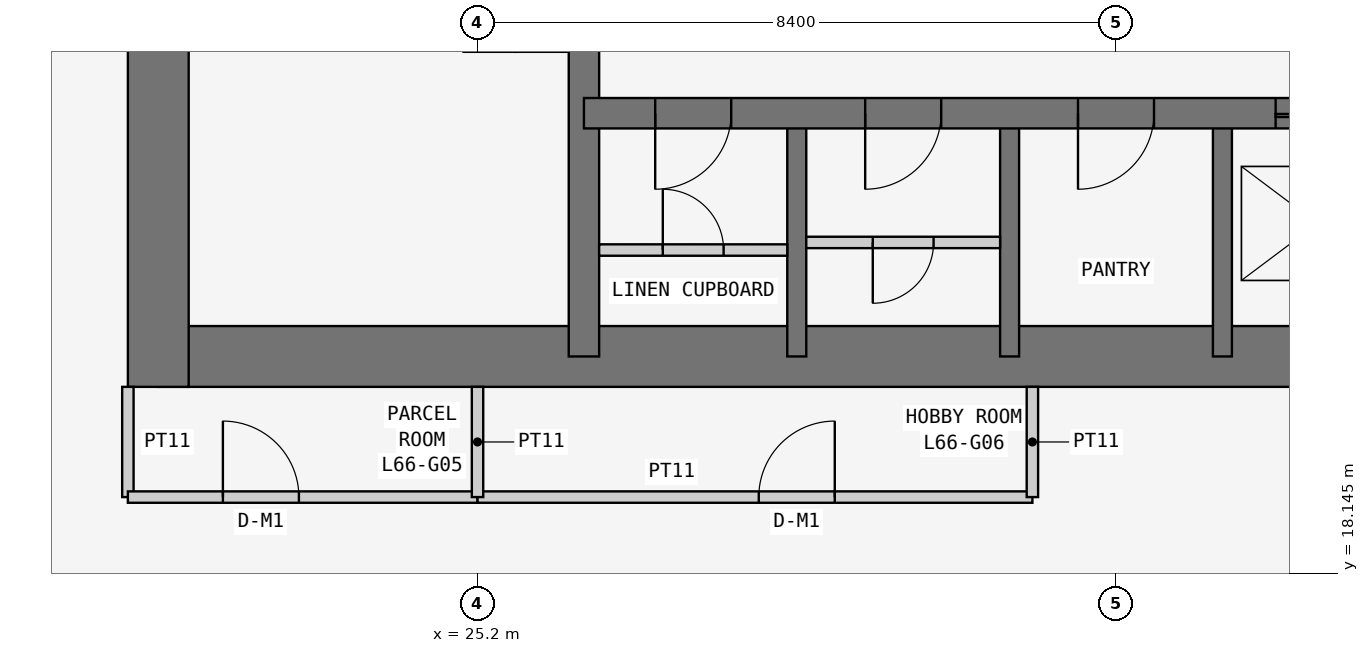
"""IFC4 building model, lengths in metres.
Left out: names, types, materials, properties, quantities, classifications, styles, units other than length and angle.
Written with IfcOpenShell. Run it as: python <this file> out.ifc"""

import sys

from ifc_helpers import new_model, si_unit, direction, frame, frame_2d, origin, place, context, subcontext, project, spatial, rectangle, extrude, element, fill, save


model = new_model("IFC4")
c1 = context("Model", 3, precision=1e-05, world=origin(), true_north=direction((0.0, 1.0)))
c2 = subcontext(c1, "Body", "Model", "MODEL_VIEW")
j1 = project(units=[si_unit("LENGTHUNIT", "METRE"), si_unit("PLANEANGLEUNIT", "RADIAN")], contexts=[c1])
p1 = place(None, origin())
s1 = spatial("IfcSite", under=j1, at=p1, CompositionType="ELEMENT")
p2 = place(p1, origin())
s2 = spatial("IfcBuilding", under=s1, at=p2, CompositionType="ELEMENT")
p3 = place(p2, frame((0.0, 0.0, 254.1)))
s3 = spatial("IfcBuildingStorey", under=s2, at=p3, CompositionType="ELEMENT", Elevation=254.1)
p4 = place(p3, frame((21.0, 21.0, 0.0), z_axis=(0.0, 0.0, 1.0), x_axis=(1.0, 0.0, 0.0)))
e1 = element("IfcWall", 1, at=p4, inside=s3, PredefinedType="SHEAR", context=c2, shape_type="SweptSolid", body=[
    extrude(rectangle(XDim=17.2, YDim=0.8, at=frame_2d((8.6, 0.0))), origin(), (0.0, 0.0, 1.0), 3.6),
])
p5 = place(p3, frame((21.0, 37.8, 0.0), z_axis=(0.0, 0.0, 1.0), x_axis=(0.0, -1.0, 0.0)))
e2 = element("IfcWall", 2, at=p5, inside=s3, PredefinedType="SHEAR", context=c2, shape_type="SweptSolid", body=[
    extrude(rectangle(XDim=17.2, YDim=0.8, at=frame_2d((8.6, 0.0))), origin(), (0.0, 0.0, 1.0), 3.6),
])
p6 = place(p5, frame((5.4, 0.0, 0.0)))
e3 = element("IfcOpeningElement", 3, at=p6, cuts=e2, PredefinedType="OPENING", context=c2, shape_type="SweptSolid", body=[
    extrude(rectangle(XDim=1.2, YDim=2.1, at=frame_2d((0.6, 1.05))), frame((0.0, 0.41, 0.0), z_axis=(0.0, -1.0, 0.0), x_axis=(1.0, 0.0, 0.0)), (0.0, 0.0, 1.0), 0.82),
])
p7 = place(p3, frame((26.6, 21.0, 0.0), z_axis=(0.0, 0.0, 1.0), x_axis=(0.0, 1.0, 0.0)))
e4 = element("IfcWall", 4, at=p7, inside=s3, PredefinedType="SHEAR", context=c2, shape_type="SweptSolid", body=[
    extrude(rectangle(XDim=16.8, YDim=0.4, at=frame_2d((8.4, 0.0))), origin(), (0.0, 0.0, 1.0), 3.6),
])
p8 = place(p7, frame((10.4, 0.0, 0.0)))
e5 = element("IfcOpeningElement", 5, at=p8, cuts=e4, PredefinedType="OPENING", context=c2, shape_type="SweptSolid", body=[
    extrude(rectangle(XDim=1.2, YDim=2.1, at=frame_2d((0.6, 1.05))), frame((0.0, 0.21, 0.0), z_axis=(0.0, -1.0, 0.0), x_axis=(1.0, 0.0, 0.0)), (0.0, 0.0, 1.0), 0.42),
])
p9 = place(p3, frame((26.6, 24.2, 0.0), z_axis=(0.0, 0.0, 1.0), x_axis=(1.0, 0.0, 0.0)))
e6 = element("IfcWall", 6, at=p9, inside=s3, PredefinedType="SHEAR", context=c2, shape_type="SweptSolid", body=[
    extrude(rectangle(XDim=11.2, YDim=0.4, at=frame_2d((5.6, 0.0))), origin(), (0.0, 0.0, 1.0), 3.6),
])
p10 = place(p9, frame((0.938, 0.0, 0.0)))
e7 = element("IfcOpeningElement", 7, at=p10, cuts=e6, PredefinedType="OPENING", context=c2, shape_type="SweptSolid", body=[
    extrude(rectangle(XDim=1.0, YDim=2.1, at=frame_2d((0.5, 1.05))), frame((0.0, 0.21, 0.0), z_axis=(0.0, -1.0, 0.0), x_axis=(1.0, 0.0, 0.0)), (0.0, 0.0, 1.0), 0.42),
])
p11 = place(p9, frame((3.7, 0.0, 0.0)))
e8 = element("IfcOpeningElement", 8, at=p11, cuts=e6, PredefinedType="OPENING", context=c2, shape_type="SweptSolid", body=[
    extrude(rectangle(XDim=1.0, YDim=2.1, at=frame_2d((0.5, 1.05))), frame((0.0, 0.21, 0.0), z_axis=(0.0, -1.0, 0.0), x_axis=(1.0, 0.0, 0.0)), (0.0, 0.0, 1.0), 0.42),
])
p12 = place(p9, frame((6.5, 0.0, 0.0)))
e9 = element("IfcOpeningElement", 9, at=p12, cuts=e6, PredefinedType="OPENING", context=c2, shape_type="SweptSolid", body=[
    extrude(rectangle(XDim=1.0, YDim=2.1, at=frame_2d((0.5, 1.05))), frame((0.0, 0.21, 0.0), z_axis=(0.0, -1.0, 0.0), x_axis=(1.0, 0.0, 0.0)), (0.0, 0.0, 1.0), 0.42),
])
p13 = place(p9, frame((9.1, 0.0, 0.0)))
e10 = element("IfcOpeningElement", 10, at=p13, cuts=e6, PredefinedType="OPENING", context=c2, shape_type="SweptSolid", body=[
    extrude(rectangle(XDim=1.1, YDim=2.1, at=frame_2d((0.55, 1.05))), frame((0.0, 0.21, 0.0), z_axis=(0.0, -1.0, 0.0), x_axis=(1.0, 0.0, 0.0)), (0.0, 0.0, 1.0), 0.42),
])
for number, where, z_axis, x_axis in (
    (11, (29.4, 21.0, 0.0), (0.0, 0.0, 1.0), (0.0, 1.0, 0.0)),
    (12, (32.2, 21.0, 0.0), (0.0, 0.0, 1.0), (0.0, 1.0, 0.0)),
    (13, (35.0, 21.0, 0.0), (0.0, 0.0, 1.0), (0.0, 1.0, 0.0)),
):
    element("IfcWall", number, at=place(p3, frame(where, z_axis=z_axis, x_axis=x_axis)), inside=s3, PredefinedType="SHEAR", context=c2, shape_type="SweptSolid", body=[
        extrude(rectangle(XDim=3.2, YDim=0.25, at=frame_2d((1.6, 0.0))), origin(), (0.0, 0.0, 1.0), 3.6),
    ])
p14 = place(p3, frame((20.6, 20.6, 0.0), z_axis=(0.0, 0.0, 1.0), x_axis=(0.0, -1.0, 0.0)))
e14 = element("IfcWall", 14, at=p14, inside=s3, PredefinedType="PARTITIONING", context=c2, shape_type="SweptSolid", body=[
    extrude(rectangle(XDim=1.45, YDim=0.15, at=frame_2d((0.725, 0.0))), origin(), (0.0, 0.0, 1.0), 3.45),
])
p15 = place(p3, frame((20.6, 19.15, 0.0), z_axis=(0.0, 0.0, 1.0), x_axis=(1.0, 0.0, 0.0)))
e15 = element("IfcWall", 15, at=p15, inside=s3, PredefinedType="PARTITIONING", context=c2, shape_type="SweptSolid", body=[
    extrude(rectangle(XDim=4.6, YDim=0.15, at=frame_2d((2.3, 0.0))), origin(), (0.0, 0.0, 1.0), 3.45),
])
p16 = place(p15, frame((1.25, 0.0, 0.0)))
e16 = element("IfcOpeningElement", 16, at=p16, cuts=e15, PredefinedType="OPENING", context=c2, shape_type="SweptSolid", body=[
    extrude(rectangle(XDim=1.0, YDim=2.1, at=frame_2d((0.5, 1.05))), frame((0.0, 0.085, 0.0), z_axis=(0.0, -1.0, 0.0), x_axis=(1.0, 0.0, 0.0)), (0.0, 0.0, 1.0), 0.17),
])
p17 = place(p3, frame((25.2, 19.15, 0.0), z_axis=(0.0, 0.0, 1.0), x_axis=(1.0, 0.0, 0.0)))
e17 = element("IfcWall", 17, at=p17, inside=s3, PredefinedType="PARTITIONING", context=c2, shape_type="SweptSolid", body=[
    extrude(rectangle(XDim=7.3, YDim=0.15, at=frame_2d((3.65, 0.0))), origin(), (0.0, 0.0, 1.0), 3.45),
])
p18 = place(p17, frame((3.7, 0.0, 0.0)))
e18 = element("IfcOpeningElement", 18, at=p18, cuts=e17, PredefinedType="OPENING", context=c2, shape_type="SweptSolid", body=[
    extrude(rectangle(XDim=1.0, YDim=2.1, at=frame_2d((0.5, 1.05))), frame((0.0, 0.085, 0.0), z_axis=(0.0, -1.0, 0.0), x_axis=(1.0, 0.0, 0.0)), (0.0, 0.0, 1.0), 0.17),
])
p19 = place(p3, frame((32.5, 19.15, 0.0), z_axis=(0.0, 0.0, 1.0), x_axis=(0.0, 1.0, 0.0)))
e19 = element("IfcWall", 19, at=p19, inside=s3, PredefinedType="PARTITIONING", context=c2, shape_type="SweptSolid", body=[
    extrude(rectangle(XDim=1.45, YDim=0.15, at=frame_2d((0.725, 0.0))), origin(), (0.0, 0.0, 1.0), 3.45),
])
p20 = place(p3, frame((25.2, 19.15, 0.0), z_axis=(0.0, 0.0, 1.0), x_axis=(0.0, 1.0, 0.0)))
e20 = element("IfcWall", 20, at=p20, inside=s3, PredefinedType="PARTITIONING", context=c2, shape_type="SweptSolid", body=[
    extrude(rectangle(XDim=1.45, YDim=0.15, at=frame_2d((0.725, 0.0))), origin(), (0.0, 0.0, 1.0), 2.767),
])
p21 = place(p3, frame((26.8, 22.4, 0.0), z_axis=(0.0, 0.0, 1.0), x_axis=(1.0, 0.0, 0.0)))
e21 = element("IfcWall", 21, at=p21, inside=s3, PredefinedType="PARTITIONING", context=c2, shape_type="SweptSolid", body=[
    extrude(rectangle(XDim=2.475, YDim=0.15, at=frame_2d((1.237, 0.0))), origin(), (0.0, 0.0, 1.0), 3.45),
])
p22 = place(p21, frame((0.837, 0.0, 0.0)))
e22 = element("IfcOpeningElement", 22, at=p22, cuts=e21, PredefinedType="OPENING", context=c2, shape_type="SweptSolid", body=[
    extrude(rectangle(XDim=0.8, YDim=2.1, at=frame_2d((0.4, 1.05))), frame((0.0, 0.085, 0.0), z_axis=(0.0, -1.0, 0.0), x_axis=(1.0, 0.0, 0.0)), (0.0, 0.0, 1.0), 0.17),
])
p23 = place(p3, frame((29.525, 22.5, 0.0), z_axis=(0.0, 0.0, 1.0), x_axis=(1.0, 0.0, 0.0)))
e23 = element("IfcWall", 23, at=p23, inside=s3, PredefinedType="PARTITIONING", context=c2, shape_type="SweptSolid", body=[
    extrude(rectangle(XDim=2.55, YDim=0.15, at=frame_2d((1.275, 0.0))), origin(), (0.0, 0.0, 1.0), 3.45),
])
p24 = place(p23, frame((0.875, 0.0, 0.0)))
e24 = element("IfcOpeningElement", 24, at=p24, cuts=e23, PredefinedType="OPENING", context=c2, shape_type="SweptSolid", body=[
    extrude(rectangle(XDim=0.8, YDim=2.1, at=frame_2d((0.4, 1.05))), frame((0.0, 0.085, 0.0), z_axis=(0.0, -1.0, 0.0), x_axis=(1.0, 0.0, 0.0)), (0.0, 0.0, 1.0), 0.17),
])
p25 = place(p16, origin())
e25 = element("IfcDoor", 25, at=p25, inside=s3, OperationType="SINGLE_SWING_LEFT", PredefinedType="DOOR", context=c2, shape_type="SweptSolid", body=[
    extrude(rectangle(XDim=1.0, YDim=2.1, at=frame_2d((0.5, 1.05))), frame((0.0, 0.025, 0.0), z_axis=(0.0, -1.0, 0.0), x_axis=(1.0, 0.0, 0.0)), (0.0, 0.0, 1.0), 0.05),
])
fill(e16, e25)
p26 = place(p18, origin())
e26 = element("IfcDoor", 26, at=p26, inside=s3, OperationType="SINGLE_SWING_RIGHT", PredefinedType="DOOR", context=c2, shape_type="SweptSolid", body=[
    extrude(rectangle(XDim=1.0, YDim=2.1, at=frame_2d((0.5, 1.05))), frame((0.0, 0.025, 0.0), z_axis=(0.0, -1.0, 0.0), x_axis=(1.0, 0.0, 0.0)), (0.0, 0.0, 1.0), 0.05),
])
fill(e18, e26)
p27 = place(p10, frame((1.0, 0.0, 0.0), z_axis=(0.0, 0.0, 1.0), x_axis=(-1.0, 0.0, 0.0)))
e27 = element("IfcDoor", 27, at=p27, inside=s3, OperationType="SINGLE_SWING_RIGHT", PredefinedType="DOOR", context=c2, shape_type="SweptSolid", body=[
    extrude(rectangle(XDim=1.0, YDim=2.1, at=frame_2d((0.5, 1.05))), frame((0.0, 0.025, 0.0), z_axis=(0.0, -1.0, 0.0), x_axis=(1.0, 0.0, 0.0)), (0.0, 0.0, 1.0), 0.05),
])
fill(e7, e27)
p28 = place(p22, origin())
e28 = element("IfcDoor", 28, at=p28, inside=s3, OperationType="SINGLE_SWING_LEFT", PredefinedType="DOOR", context=c2, shape_type="SweptSolid", body=[
    extrude(rectangle(XDim=0.8, YDim=2.1, at=frame_2d((0.4, 1.05))), frame((0.0, 0.025, 0.0), z_axis=(0.0, -1.0, 0.0), x_axis=(1.0, 0.0, 0.0)), (0.0, 0.0, 1.0), 0.05),
])
fill(e22, e28)
p29 = place(p11, frame((1.0, 0.0, 0.0), z_axis=(0.0, 0.0, 1.0), x_axis=(-1.0, 0.0, 0.0)))
e29 = element("IfcDoor", 29, at=p29, inside=s3, OperationType="SINGLE_SWING_RIGHT", PredefinedType="DOOR", context=c2, shape_type="SweptSolid", body=[
    extrude(rectangle(XDim=1.0, YDim=2.1, at=frame_2d((0.5, 1.05))), frame((0.0, 0.025, 0.0), z_axis=(0.0, -1.0, 0.0), x_axis=(1.0, 0.0, 0.0)), (0.0, 0.0, 1.0), 0.05),
])
fill(e8, e29)
p30 = place(p24, frame((0.8, 0.0, 0.0), z_axis=(0.0, 0.0, 1.0), x_axis=(-1.0, 0.0, 0.0)))
e30 = element("IfcDoor", 30, at=p30, inside=s3, OperationType="SINGLE_SWING_RIGHT", PredefinedType="DOOR", context=c2, shape_type="SweptSolid", body=[
    extrude(rectangle(XDim=0.8, YDim=2.1, at=frame_2d((0.4, 1.05))), frame((0.0, 0.025, 0.0), z_axis=(0.0, -1.0, 0.0), x_axis=(1.0, 0.0, 0.0)), (0.0, 0.0, 1.0), 0.05),
])
fill(e24, e30)
p31 = place(p12, frame((1.0, 0.0, 0.0), z_axis=(0.0, 0.0, 1.0), x_axis=(-1.0, 0.0, 0.0)))
e31 = element("IfcDoor", 31, at=p31, inside=s3, OperationType="SINGLE_SWING_RIGHT", PredefinedType="DOOR", context=c2, shape_type="SweptSolid", body=[
    extrude(rectangle(XDim=1.0, YDim=2.1, at=frame_2d((0.5, 1.05))), frame((0.0, 0.025, 0.0), z_axis=(0.0, -1.0, 0.0), x_axis=(1.0, 0.0, 0.0)), (0.0, 0.0, 1.0), 0.05),
])
fill(e9, e31)
p32 = place(p13, origin())
e32 = element("IfcDoor", 32, at=p32, inside=s3, OperationType="DOUBLE_DOOR_SLIDING", PredefinedType="DOOR", context=c2, shape_type="SweptSolid", body=[
    extrude(rectangle(XDim=1.1, YDim=2.1, at=frame_2d((0.55, 1.05))), frame((0.0, 0.025, 0.0), z_axis=(0.0, -1.0, 0.0), x_axis=(1.0, 0.0, 0.0)), (0.0, 0.0, 1.0), 0.05),
])
fill(e10, e32)
save(model, sys.argv[1])
